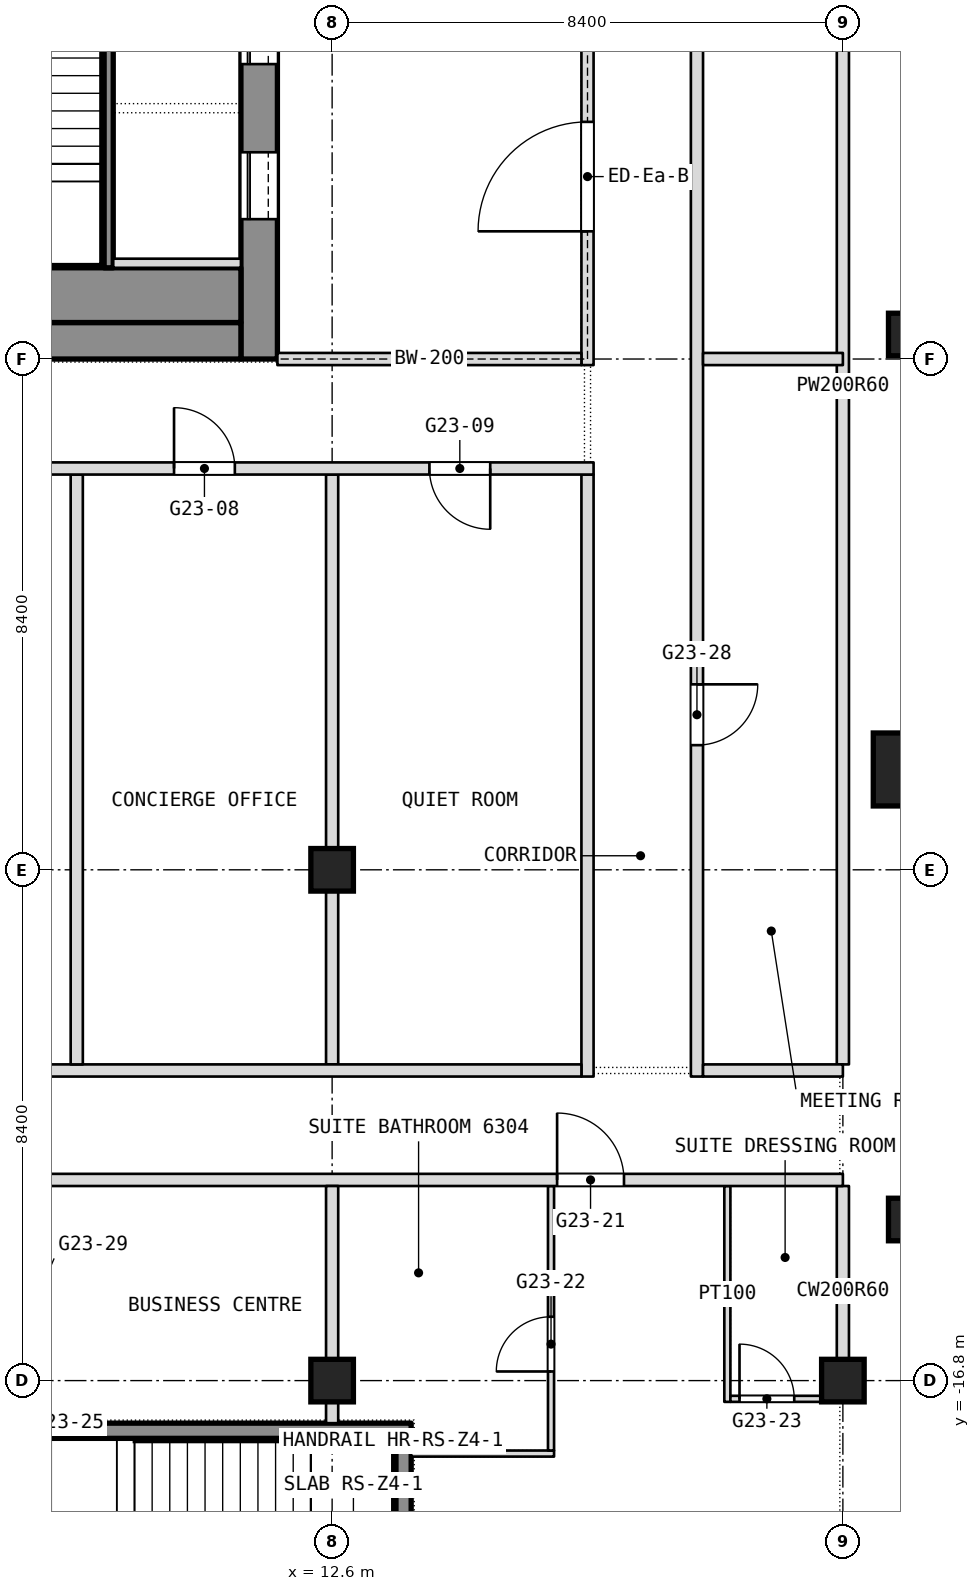
"""IFC4 building model, lengths in metres.
Left out: names, types, materials, properties, quantities, classifications, styles, units other than length and angle.
Written with IfcOpenShell. Run it as: python <this file> out.ifc"""

import sys

from ifc_helpers import new_model, si_unit, direction, frame, frame_2d, origin, origin_2d, place, context, subcontext, project, spatial, rectangle, extrude, element, fill, save


model = new_model("IFC4")
c1 = context("Model", 3, precision=1e-05, world=origin(), true_north=direction((0.0, 1.0)))
c2 = subcontext(c1, "Body", "Model", "MODEL_VIEW")
j1 = project(units=[si_unit("LENGTHUNIT", "METRE"), si_unit("PLANEANGLEUNIT", "RADIAN")], contexts=[c1])
p1 = place(None, origin())
s1 = spatial("IfcSite", under=j1, at=p1, CompositionType="ELEMENT")
p2 = place(p1, origin())
s2 = spatial("IfcBuilding", under=s1, at=p2, CompositionType="ELEMENT")
p3 = place(p2, frame((0.0, 0.0, 274.1)))
s3 = spatial("IfcBuildingStorey", under=s2, at=p3, CompositionType="ELEMENT", Elevation=274.1)
p4 = place(p3, frame((11.4, 0.0, 0.0), z_axis=(0.0, 0.0, 1.0), x_axis=(0.0, 1.0, 0.0)))
e1 = element("IfcWall", 1, at=p4, inside=s3, PredefinedType="SHEAR", context=c2, shape_type="SweptSolid", body=[
    extrude(rectangle(XDim=16.8, YDim=0.6, at=frame_2d((8.4, 0.0))), origin(), (0.0, 0.0, 1.0), 3.6),
])
p5 = place(p4, frame((2.3, 0.0, 0.0)))
e2 = element("IfcOpeningElement", 2, at=p5, cuts=e1, PredefinedType="OPENING", context=c2, shape_type="SweptSolid", body=[
    extrude(rectangle(XDim=1.1, YDim=2.1, at=frame_2d((0.55, 1.05))), frame((0.0, 0.3, 0.0), z_axis=(0.0, -1.0, 0.0), x_axis=(1.0, 0.0, 0.0)), (0.0, 0.0, 1.0), 0.6),
])
p6 = place(p4, frame((4.85, 0.0, 0.0)))
e3 = element("IfcOpeningElement", 3, at=p6, cuts=e1, PredefinedType="OPENING", context=c2, shape_type="SweptSolid", body=[
    extrude(rectangle(XDim=1.1, YDim=2.1, at=frame_2d((0.55, 1.05))), frame((0.0, 0.3, 0.0), z_axis=(0.0, -1.0, 0.0), x_axis=(1.0, 0.0, 0.0)), (0.0, 0.0, 1.0), 0.6),
])
p7 = place(p4, frame((6.825, 0.0, 0.0)))
e4 = element("IfcOpeningElement", 4, at=p7, cuts=e1, PredefinedType="OPENING", context=c2, shape_type="SweptSolid", body=[
    extrude(rectangle(XDim=1.2, YDim=2.1, at=frame_2d((0.6, 1.05))), frame((0.0, 0.3, 0.0), z_axis=(0.0, -1.0, 0.0), x_axis=(1.0, 0.0, 0.0)), (0.0, 0.0, 1.0), 0.6),
])
p8 = place(p4, frame((13.4, 0.0, 0.0)))
e5 = element("IfcOpeningElement", 5, at=p8, cuts=e1, PredefinedType="OPENING", context=c2, shape_type="SweptSolid", body=[
    extrude(rectangle(XDim=1.1, YDim=2.1, at=frame_2d((0.55, 1.05))), frame((0.0, 0.3, 0.0), z_axis=(0.0, -1.0, 0.0), x_axis=(1.0, 0.0, 0.0)), (0.0, 0.0, 1.0), 0.6),
])
p9 = place(p4, frame((10.85, 0.0, 0.0)))
e6 = element("IfcOpeningElement", 6, at=p9, cuts=e1, PredefinedType="OPENING", context=c2, shape_type="SweptSolid", body=[
    extrude(rectangle(XDim=1.1, YDim=2.1, at=frame_2d((0.55, 1.05))), frame((0.0, 0.3, 0.0), z_axis=(0.0, -1.0, 0.0), x_axis=(1.0, 0.0, 0.0)), (0.0, 0.0, 1.0), 0.6),
])
p10 = place(p4, frame((8.775, 0.0, 0.0)))
e7 = element("IfcOpeningElement", 7, at=p10, cuts=e1, PredefinedType="OPENING", context=c2, shape_type="SweptSolid", body=[
    extrude(rectangle(XDim=1.2, YDim=2.1, at=frame_2d((0.6, 1.05))), frame((0.0, 0.3, 0.0), z_axis=(0.0, -1.0, 0.0), x_axis=(1.0, 0.0, 0.0)), (0.0, 0.0, 1.0), 0.6),
])
p11 = place(p3, frame((-11.1, 0.3, 0.0), z_axis=(0.0, 0.0, 1.0), x_axis=(1.0, 0.0, 0.0)))
e8 = element("IfcWall", 8, at=p11, inside=s3, PredefinedType="SHEAR", context=c2, shape_type="SweptSolid", body=[
    extrude(rectangle(XDim=22.2, YDim=0.6, at=frame_2d((11.1, 0.0))), origin(), (0.0, 0.0, 1.0), 3.6),
])
p12 = place(p3, frame((22.1, -6.75, 0.0), z_axis=(0.0, 0.0, 1.0), x_axis=(1.0, 0.0, 0.0)))
e9 = element("IfcColumn", 9, at=p12, inside=s3, PredefinedType="COLUMN", context=c2, shape_type="SweptSolid", body=[
    extrude(rectangle(XDim=1.2, YDim=1.2, at=origin_2d()), origin(), (0.0, 0.0, 1.0), 3.6),
])
for number, where, z_axis, x_axis in (
    (10, (12.6, -16.8, 0.0), (0.0, 0.0, 1.0), (1.0, 0.0, 0.0)),
    (11, (12.6, -8.4, 0.0), (0.0, 0.0, 1.0), (1.0, 0.0, 0.0)),
    (12, (21.0, -16.8, 0.0), (0.0, 0.0, 1.0), (1.0, 0.0, 0.0)),
    (13, (22.1, 0.403, 0.0), (0.0, 0.0, 1.0), (1.0, 0.0, 0.0)),
    (14, (22.1, -14.151, 0.0), (0.0, 0.0, 1.0), (1.0, 0.0, 0.0)),
):
    element("IfcColumn", number, at=place(p3, frame(where, z_axis=z_axis, x_axis=x_axis)), inside=s3, PredefinedType="COLUMN", context=c2, shape_type="SweptSolid", body=[
        extrude(rectangle(XDim=0.7, YDim=0.7, at=origin_2d()), origin(), (0.0, 0.0, 1.0), 3.6),
    ])
p13 = place(p3, frame((21.0, -17.05, 0.0), z_axis=(0.0, 0.0, 1.0), x_axis=(0.0, 1.0, 0.0)))
e15 = element("IfcWall", 15, at=p13, inside=s3, PredefinedType="PARTITIONING", context=c2, shape_type="SweptSolid", body=[
    extrude(rectangle(XDim=3.45, YDim=0.2, at=frame_2d((1.725, 0.0))), origin(), (0.0, 0.0, 1.0), 3.34),
])
p14 = place(p3, frame((21.0, -11.6, 0.0), z_axis=(0.0, 0.0, 1.0), x_axis=(0.0, 1.0, 0.0)))
e16 = element("IfcWall", 16, at=p14, inside=s3, PredefinedType="PARTITIONING", context=c2, shape_type="SweptSolid", body=[
    extrude(rectangle(XDim=22.302, YDim=0.2, at=frame_2d((11.151, 0.0))), origin(), (0.0, 0.0, 1.0), 3.34),
])
p15 = place(p3, frame((19.1, -17.15, 0.0), z_axis=(0.0, 0.0, 1.0), x_axis=(0.0, 1.0, 0.0)))
e17 = element("IfcWall", 17, at=p15, inside=s3, PredefinedType="PARTITIONING", context=c2, shape_type="SweptSolid", body=[
    extrude(rectangle(XDim=3.55, YDim=0.1, at=frame_2d((1.775, 0.0))), origin(), (0.0, 0.0, 1.0), 3.34),
])
p16 = place(p3, frame((18.6, -11.8, 0.0), z_axis=(0.0, 0.0, 1.0), x_axis=(0.0, 1.0, 0.0)))
e18 = element("IfcWall", 18, at=p16, inside=s3, PredefinedType="PARTITIONING", context=c2, shape_type="SweptSolid", body=[
    extrude(rectangle(XDim=27.336, YDim=0.2, at=frame_2d((13.668, 0.0))), origin(), (0.0, 0.0, 1.0), 3.34),
])
p17 = place(p16, frame((18.668, 0.0, 0.0)))
e19 = element("IfcOpeningElement", 19, at=p17, cuts=e18, PredefinedType="OPENING", context=c2, shape_type="SweptSolid", body=[
    extrude(rectangle(XDim=1.8, YDim=2.1, at=frame_2d((0.9, 1.05))), frame((0.0, 0.1, 0.0), z_axis=(0.0, -1.0, 0.0), x_axis=(1.0, 0.0, 0.0)), (0.0, 0.0, 1.0), 0.2),
])
p18 = place(p16, frame((5.45, 0.0, 0.0)))
e20 = element("IfcOpeningElement", 20, at=p18, cuts=e18, PredefinedType="OPENING", context=c2, shape_type="SweptSolid", body=[
    extrude(rectangle(XDim=1.0, YDim=2.1, at=frame_2d((0.5, 1.05))), frame((0.0, 0.1, 0.0), z_axis=(0.0, -1.0, 0.0), x_axis=(1.0, 0.0, 0.0)), (0.0, 0.0, 1.0), 0.2),
])
p19 = place(p3, frame((13.9, -18.0, 0.0), z_axis=(0.0, 0.0, 1.0), x_axis=(1.0, 0.0, 0.0)))
e21 = element("IfcWall", 21, at=p19, inside=s3, PredefinedType="PARTITIONING", context=c2, shape_type="SweptSolid", body=[
    extrude(rectangle(XDim=2.35, YDim=0.1, at=frame_2d((1.175, 0.0))), origin(), (0.0, 0.0, 1.0), 3.34),
])
p20 = place(p3, frame((19.15, -17.1, 0.0), z_axis=(0.0, 0.0, 1.0), x_axis=(1.0, 0.0, 0.0)))
e22 = element("IfcWall", 22, at=p20, inside=s3, PredefinedType="PARTITIONING", context=c2, shape_type="SweptSolid", body=[
    extrude(rectangle(XDim=1.85, YDim=0.1, at=frame_2d((0.925, 0.0))), origin(), (0.0, 0.0, 1.0), 3.34),
])
p21 = place(p20, frame((0.15, 0.0, 0.0)))
e23 = element("IfcOpeningElement", 23, at=p21, cuts=e22, PredefinedType="OPENING", context=c2, shape_type="SweptSolid", body=[
    extrude(rectangle(XDim=0.9, YDim=2.1, at=frame_2d((0.45, 1.05))), frame((0.0, 0.05, 0.0), z_axis=(0.0, -1.0, 0.0), x_axis=(1.0, 0.0, 0.0)), (0.0, 0.0, 1.0), 0.1),
])
p22 = place(p3, frame((16.8, -11.8, 0.0), z_axis=(0.0, 0.0, 1.0), x_axis=(0.0, 1.0, 0.0)))
e24 = element("IfcWall", 24, at=p22, inside=s3, PredefinedType="PARTITIONING", context=c2, shape_type="SweptSolid", body=[
    extrude(rectangle(XDim=9.9, YDim=0.2, at=frame_2d((4.95, 0.0))), origin(), (0.0, 0.0, 1.0), 3.34),
])
p23 = place(p3, frame((16.2, -17.95, 0.0), z_axis=(0.0, 0.0, 1.0), x_axis=(0.0, 1.0, 0.0)))
e25 = element("IfcWall", 25, at=p23, inside=s3, PredefinedType="PARTITIONING", context=c2, shape_type="SweptSolid", body=[
    extrude(rectangle(XDim=4.35, YDim=0.1, at=frame_2d((2.175, 0.0))), origin(), (0.0, 0.0, 1.0), 3.34),
])
p24 = place(p23, frame((1.3, 0.0, 0.0)))
e26 = element("IfcOpeningElement", 26, at=p24, cuts=e25, PredefinedType="OPENING", context=c2, shape_type="SweptSolid", body=[
    extrude(rectangle(XDim=0.9, YDim=2.1, at=frame_2d((0.45, 1.05))), frame((0.0, 0.05, 0.0), z_axis=(0.0, -1.0, 0.0), x_axis=(1.0, 0.0, 0.0)), (0.0, 0.0, 1.0), 0.1),
])
p25 = place(p3, frame((7.6, -13.5, 0.0), z_axis=(0.0, 0.0, 1.0), x_axis=(1.0, 0.0, 0.0)))
e27 = element("IfcWall", 27, at=p25, inside=s3, PredefinedType="PARTITIONING", context=c2, shape_type="SweptSolid", body=[
    extrude(rectangle(XDim=13.4, YDim=0.2, at=frame_2d((6.7, 0.0))), origin(), (0.0, 0.0, 1.0), 3.34),
])
p26 = place(p25, frame((8.7, 0.0, 0.0)))
e28 = element("IfcOpeningElement", 28, at=p26, cuts=e27, PredefinedType="OPENING", context=c2, shape_type="SweptSolid", body=[
    extrude(rectangle(XDim=1.1, YDim=2.1, at=frame_2d((0.55, 1.05))), frame((0.0, 0.1, 0.0), z_axis=(0.0, -1.0, 0.0), x_axis=(1.0, 0.0, 0.0)), (0.0, 0.0, 1.0), 0.2),
])
p27 = place(p3, frame((12.6, -17.5, 0.0), z_axis=(0.0, 0.0, 1.0), x_axis=(0.0, 1.0, 0.0)))
e29 = element("IfcWall", 29, at=p27, inside=s3, PredefinedType="PARTITIONING", context=c2, shape_type="SweptSolid", body=[
    extrude(rectangle(XDim=3.9, YDim=0.2, at=frame_2d((1.95, 0.0))), origin(), (0.0, 0.0, 1.0), 3.34),
])
p28 = place(p3, frame((12.6, -11.6, 0.0), z_axis=(0.0, 0.0, 1.0), x_axis=(0.0, 1.0, 0.0)))
e30 = element("IfcWall", 30, at=p28, inside=s3, PredefinedType="PARTITIONING", context=c2, shape_type="SweptSolid", body=[
    extrude(rectangle(XDim=9.7, YDim=0.2, at=frame_2d((4.85, 0.0))), origin(), (0.0, 0.0, 1.0), 3.34),
])
p29 = place(p3, frame((-8.3, -11.7, 0.0), z_axis=(0.0, 0.0, 1.0), x_axis=(1.0, 0.0, 0.0)))
e31 = element("IfcWall", 31, at=p29, inside=s3, PredefinedType="PARTITIONING", context=c2, shape_type="SweptSolid", body=[
    extrude(rectangle(XDim=25.0, YDim=0.2, at=frame_2d((12.5, 0.0))), origin(), (0.0, 0.0, 1.0), 3.34),
])
p30 = place(p3, frame((18.7, -11.7, 0.0), z_axis=(0.0, 0.0, 1.0), x_axis=(1.0, 0.0, 0.0)))
e32 = element("IfcWall", 32, at=p30, inside=s3, PredefinedType="PARTITIONING", context=c2, shape_type="SweptSolid", body=[
    extrude(rectangle(XDim=2.3, YDim=0.2, at=frame_2d((1.15, 0.0))), origin(), (0.0, 0.0, 1.0), 3.34),
])
p31 = place(p3, frame((8.4, -11.6, 0.0), z_axis=(0.0, 0.0, 1.0), x_axis=(0.0, 1.0, 0.0)))
e33 = element("IfcWall", 33, at=p31, inside=s3, PredefinedType="PARTITIONING", context=c2, shape_type="SweptSolid", body=[
    extrude(rectangle(XDim=9.7, YDim=0.2, at=frame_2d((4.85, 0.0))), origin(), (0.0, 0.0, 1.0), 3.34),
])
p32 = place(p3, frame((-16.9, -1.8, 0.0), z_axis=(0.0, 0.0, 1.0), x_axis=(1.0, 0.0, 0.0)))
e34 = element("IfcWall", 34, at=p32, inside=s3, PredefinedType="PARTITIONING", context=c2, shape_type="SweptSolid", body=[
    extrude(rectangle(XDim=33.8, YDim=0.2, at=frame_2d((16.9, 0.0))), origin(), (0.0, 0.0, 1.0), 3.34),
])
p33 = place(p32, frame((1.7, 0.0, 0.0)))
e35 = element("IfcOpeningElement", 35, at=p33, cuts=e34, PredefinedType="OPENING", context=c2, shape_type="SweptSolid", body=[
    extrude(rectangle(XDim=1.0, YDim=2.1, at=frame_2d((0.5, 1.05))), frame((0.0, 0.1, 0.0), z_axis=(0.0, -1.0, 0.0), x_axis=(1.0, 0.0, 0.0)), (0.0, 0.0, 1.0), 0.2),
])
p34 = place(p32, frame((5.9, 0.0, 0.0)))
e36 = element("IfcOpeningElement", 36, at=p34, cuts=e34, PredefinedType="OPENING", context=c2, shape_type="SweptSolid", body=[
    extrude(rectangle(XDim=1.0, YDim=2.1, at=frame_2d((0.5, 1.05))), frame((0.0, 0.1, 0.0), z_axis=(0.0, -1.0, 0.0), x_axis=(1.0, 0.0, 0.0)), (0.0, 0.0, 1.0), 0.2),
])
p35 = place(p32, frame((10.1, 0.0, 0.0)))
e37 = element("IfcOpeningElement", 37, at=p35, cuts=e34, PredefinedType="OPENING", context=c2, shape_type="SweptSolid", body=[
    extrude(rectangle(XDim=1.0, YDim=2.1, at=frame_2d((0.5, 1.05))), frame((0.0, 0.1, 0.0), z_axis=(0.0, -1.0, 0.0), x_axis=(1.0, 0.0, 0.0)), (0.0, 0.0, 1.0), 0.2),
])
p36 = place(p32, frame((16.0, 0.0, 0.0)))
e38 = element("IfcOpeningElement", 38, at=p36, cuts=e34, PredefinedType="OPENING", context=c2, shape_type="SweptSolid", body=[
    extrude(rectangle(XDim=1.8, YDim=2.1, at=frame_2d((0.9, 1.05))), frame((0.0, 0.1, 0.0), z_axis=(0.0, -1.0, 0.0), x_axis=(1.0, 0.0, 0.0)), (0.0, 0.0, 1.0), 0.2),
])
p37 = place(p32, frame((22.7, 0.0, 0.0)))
e39 = element("IfcOpeningElement", 39, at=p37, cuts=e34, PredefinedType="OPENING", context=c2, shape_type="SweptSolid", body=[
    extrude(rectangle(XDim=1.0, YDim=2.1, at=frame_2d((0.5, 1.05))), frame((0.0, 0.1, 0.0), z_axis=(0.0, -1.0, 0.0), x_axis=(1.0, 0.0, 0.0)), (0.0, 0.0, 1.0), 0.2),
])
p38 = place(p32, frame((26.9, 0.0, 0.0)))
e40 = element("IfcOpeningElement", 40, at=p38, cuts=e34, PredefinedType="OPENING", context=c2, shape_type="SweptSolid", body=[
    extrude(rectangle(XDim=1.0, YDim=2.1, at=frame_2d((0.5, 1.05))), frame((0.0, 0.1, 0.0), z_axis=(0.0, -1.0, 0.0), x_axis=(1.0, 0.0, 0.0)), (0.0, 0.0, 1.0), 0.2),
])
p39 = place(p32, frame((31.1, 0.0, 0.0)))
e41 = element("IfcOpeningElement", 41, at=p39, cuts=e34, PredefinedType="OPENING", context=c2, shape_type="SweptSolid", body=[
    extrude(rectangle(XDim=1.0, YDim=2.1, at=frame_2d((0.5, 1.05))), frame((0.0, 0.1, 0.0), z_axis=(0.0, -1.0, 0.0), x_axis=(1.0, 0.0, 0.0)), (0.0, 0.0, 1.0), 0.2),
])
p40 = place(p3, frame((18.7, 0.0, 0.0), z_axis=(0.0, 0.0, 1.0), x_axis=(1.0, 0.0, 0.0)))
e42 = element("IfcWall", 42, at=p40, inside=s3, PredefinedType="PARTITIONING", context=c2, shape_type="SweptSolid", body=[
    extrude(rectangle(XDim=2.3, YDim=0.2, at=frame_2d((1.15, 0.0))), origin(), (0.0, 0.0, 1.0), 3.0),
])
p41 = place(p3, frame((-11.1, 1.05, 0.0), z_axis=(0.0, 0.0, 1.0), x_axis=(1.0, 0.0, 0.0)))
e43 = element("IfcWall", 43, at=p41, inside=s3, PredefinedType="PARTITIONING", context=c2, shape_type="SweptSolid", body=[
    extrude(rectangle(XDim=22.2, YDim=0.9, at=frame_2d((11.1, 0.0))), origin(), (0.0, 0.0, 1.0), 3.34),
])
p42 = place(p3, frame((8.925, 1.5, 0.0), z_axis=(0.0, 0.0, 1.0), x_axis=(0.0, 1.0, 0.0)))
e44 = element("IfcWall", 44, at=p42, inside=s3, PredefinedType="SHEAR", context=c2, shape_type="SweptSolid", body=[
    extrude(rectangle(XDim=6.6, YDim=0.15, at=frame_2d((3.3, 0.0))), origin(), (0.0, 0.0, 1.0), 3.34),
])
p43 = place(p42, frame((5.325, 0.0, 0.0)))
e45 = element("IfcOpeningElement", 45, at=p43, cuts=e44, PredefinedType="OPENING", context=c2, shape_type="SweptSolid", body=[
    extrude(rectangle(XDim=1.2, YDim=2.1, at=frame_2d((0.6, 1.05))), frame((0.0, 0.075, 0.0), z_axis=(0.0, -1.0, 0.0), x_axis=(1.0, 0.0, 0.0)), (0.0, 0.0, 1.0), 0.15),
])
p44 = place(p3, frame((9.0, 1.575, 0.0), z_axis=(0.0, 0.0, 1.0), x_axis=(1.0, 0.0, 0.0)))
e46 = element("IfcWall", 46, at=p44, inside=s3, PredefinedType="SHEAR", context=c2, shape_type="SweptSolid", body=[
    extrude(rectangle(XDim=2.1, YDim=0.15, at=frame_2d((1.05, 0.0))), origin(), (0.0, 0.0, 1.0), 3.6),
])
p45 = place(p3, frame((16.8, -0.1, 0.0), z_axis=(0.0, 0.0, 1.0), x_axis=(0.0, 1.0, 0.0)))
e47 = element("IfcWall", 47, at=p45, inside=s3, PredefinedType="PARTITIONING", context=c2, shape_type="SweptSolid", body=[
    extrude(rectangle(XDim=17.0, YDim=0.2, at=frame_2d((8.5, 0.0))), origin(), (0.0, 0.0, 1.0), 3.34),
])
p46 = place(p45, frame((2.2, 0.0, 0.0)))
e48 = element("IfcOpeningElement", 48, at=p46, cuts=e47, PredefinedType="OPENING", context=c2, shape_type="SweptSolid", body=[
    extrude(rectangle(XDim=1.8, YDim=2.1, at=frame_2d((0.9, 1.05))), frame((0.0, 0.1, 0.0), z_axis=(0.0, -1.0, 0.0), x_axis=(1.0, 0.0, 0.0)), (0.0, 0.0, 1.0), 0.2),
])
p47 = place(p45, frame((13.0, 0.0, 0.0)))
e49 = element("IfcOpeningElement", 49, at=p47, cuts=e47, PredefinedType="OPENING", context=c2, shape_type="SweptSolid", body=[
    extrude(rectangle(XDim=1.8, YDim=2.1, at=frame_2d((0.9, 1.05))), frame((0.0, 0.1, 0.0), z_axis=(0.0, -1.0, 0.0), x_axis=(1.0, 0.0, 0.0)), (0.0, 0.0, 1.0), 0.2),
])
p48 = place(p3, frame((11.7, 0.0, 0.0), z_axis=(0.0, 0.0, 1.0), x_axis=(1.0, 0.0, 0.0)))
e50 = element("IfcWall", 50, at=p48, inside=s3, PredefinedType="PARTITIONING", context=c2, shape_type="SweptSolid", body=[
    extrude(rectangle(XDim=5.0, YDim=0.2, at=frame_2d((2.5, 0.0))), origin(), (0.0, 0.0, 1.0), 3.0),
])
p49 = place(p3, frame((7.7, -17.625, 0.1), z_axis=(0.0, 0.0, 1.0), x_axis=(1.0, 0.0, 0.0)))
e51 = element("IfcWall", 51, at=p49, inside=s3, PredefinedType="SHEAR", context=c2, shape_type="SweptSolid", body=[
    extrude(rectangle(XDim=6.2, YDim=0.25, at=frame_2d((3.1, 0.0))), origin(), (0.0, 0.0, 1.0), 3.6),
])
p50 = place(p3, frame((13.775, -20.65, 0.1), z_axis=(0.0, 0.0, 1.0), x_axis=(0.0, 1.0, 0.0)))
e52 = element("IfcWall", 52, at=p50, inside=s3, PredefinedType="SHEAR", context=c2, shape_type="SweptSolid", body=[
    extrude(rectangle(XDim=2.9, YDim=0.25, at=frame_2d((1.45, 0.0))), origin(), (0.0, 0.0, 1.0), 3.6),
])
p51 = place(p18, origin())
e53 = element("IfcDoor", 53, at=p51, inside=s3, OperationType="SINGLE_SWING_LEFT", PredefinedType="DOOR", context=c2, shape_type="SweptSolid", body=[
    extrude(rectangle(XDim=1.0, YDim=2.1, at=frame_2d((0.5, 1.05))), frame((0.0, 0.025, 0.0), z_axis=(0.0, -1.0, 0.0), x_axis=(1.0, 0.0, 0.0)), (0.0, 0.0, 1.0), 0.05),
])
fill(e20, e53)
p52 = place(p21, origin())
e54 = element("IfcDoor", 54, at=p52, inside=s3, OperationType="SINGLE_SWING_LEFT", PredefinedType="DOOR", context=c2, shape_type="SweptSolid", body=[
    extrude(rectangle(XDim=0.9, YDim=2.1, at=frame_2d((0.45, 1.05))), frame((0.0, 0.025, 0.0), z_axis=(0.0, -1.0, 0.0), x_axis=(1.0, 0.0, 0.0)), (0.0, 0.0, 1.0), 0.05),
])
fill(e23, e54)
p53 = place(p24, origin())
e55 = element("IfcDoor", 55, at=p53, inside=s3, OperationType="SINGLE_SWING_LEFT", PredefinedType="DOOR", context=c2, shape_type="SweptSolid", body=[
    extrude(rectangle(XDim=0.9, YDim=2.1, at=frame_2d((0.45, 1.05))), frame((0.0, 0.025, 0.0), z_axis=(0.0, -1.0, 0.0), x_axis=(1.0, 0.0, 0.0)), (0.0, 0.0, 1.0), 0.05),
])
fill(e26, e55)
p54 = place(p26, origin())
e56 = element("IfcDoor", 56, at=p54, inside=s3, OperationType="SINGLE_SWING_RIGHT", PredefinedType="DOOR", context=c2, shape_type="SweptSolid", body=[
    extrude(rectangle(XDim=1.1, YDim=2.1, at=frame_2d((0.55, 1.05))), frame((0.0, 0.025, 0.0), z_axis=(0.0, -1.0, 0.0), x_axis=(1.0, 0.0, 0.0)), (0.0, 0.0, 1.0), 0.05),
])
fill(e28, e56)
p55 = place(p38, origin())
e57 = element("IfcDoor", 57, at=p55, inside=s3, OperationType="SINGLE_SWING_LEFT", PredefinedType="DOOR", context=c2, shape_type="SweptSolid", body=[
    extrude(rectangle(XDim=1.0, YDim=2.1, at=frame_2d((0.5, 1.05))), frame((0.0, 0.025, 0.0), z_axis=(0.0, -1.0, 0.0), x_axis=(1.0, 0.0, 0.0)), (0.0, 0.0, 1.0), 0.05),
])
fill(e40, e57)
p56 = place(p39, origin())
e58 = element("IfcDoor", 58, at=p56, inside=s3, OperationType="SINGLE_SWING_RIGHT", PredefinedType="DOOR", context=c2, shape_type="SweptSolid", body=[
    extrude(rectangle(XDim=1.0, YDim=2.1, at=frame_2d((0.5, 1.05))), frame((0.0, 0.025, 0.0), z_axis=(0.0, -1.0, 0.0), x_axis=(1.0, 0.0, 0.0)), (0.0, 0.0, 1.0), 0.05),
])
fill(e41, e58)
p57 = place(p5, origin())
e59 = element("IfcDoor", 59, at=p57, inside=s3, OperationType="SLIDING_TO_LEFT", PredefinedType="DOOR", context=c2, shape_type="SweptSolid", body=[
    extrude(rectangle(XDim=1.1, YDim=2.1, at=frame_2d((0.55, 1.05))), frame((0.0, 0.025, 0.0), z_axis=(0.0, -1.0, 0.0), x_axis=(1.0, 0.0, 0.0)), (0.0, 0.0, 1.0), 0.05),
])
fill(e2, e59)
p58 = place(p6, origin())
e60 = element("IfcDoor", 60, at=p58, inside=s3, OperationType="SLIDING_TO_LEFT", PredefinedType="DOOR", context=c2, shape_type="SweptSolid", body=[
    extrude(rectangle(XDim=1.1, YDim=2.1, at=frame_2d((0.55, 1.05))), frame((0.0, 0.025, 0.0), z_axis=(0.0, -1.0, 0.0), x_axis=(1.0, 0.0, 0.0)), (0.0, 0.0, 1.0), 0.05),
])
fill(e3, e60)
p59 = place(p46, origin())
e61 = element("IfcDoor", 61, at=p59, inside=s3, OperationType="DOUBLE_DOOR_SINGLE_SWING", PredefinedType="DOOR", context=c2, shape_type="SweptSolid", body=[
    extrude(rectangle(XDim=1.8, YDim=2.1, at=frame_2d((0.9, 1.05))), frame((0.0, 0.025, 0.0), z_axis=(0.0, -1.0, 0.0), x_axis=(1.0, 0.0, 0.0)), (0.0, 0.0, 1.0), 0.05),
])
fill(e48, e61)
save(model, sys.argv[1])
